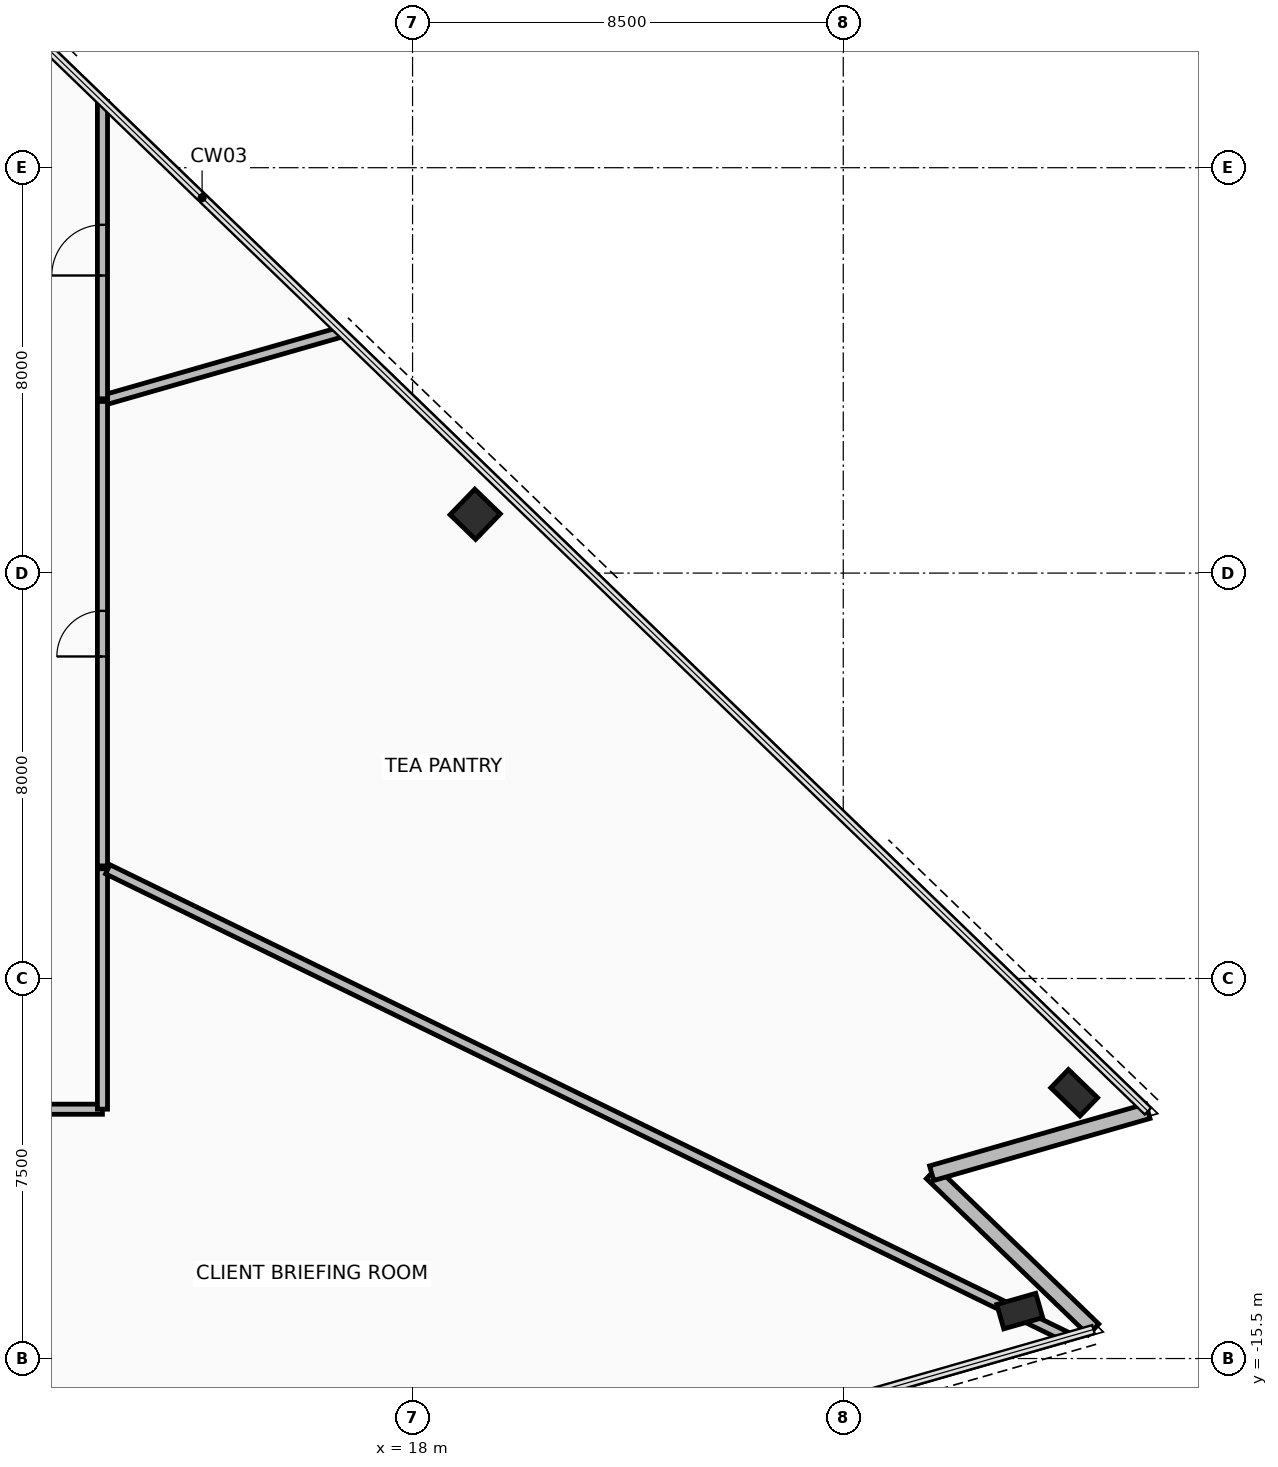
"""IFC4 building model, lengths in metres.
Left out: names, types, materials, properties, quantities, classifications, styles, units other than length and angle.
Written with IfcOpenShell. Run it as: python <this file> out.ifc"""

import sys

from ifc_helpers import new_model, si_unit, direction, frame, frame_2d, origin, origin_2d, place, context, subcontext, project, spatial, rectangle, hollow_rectangle, extrude, element, fill, save


model = new_model("IFC4")
c1 = context("Model", 3, precision=1e-05, world=origin(), true_north=direction((0.0, 1.0)))
c2 = subcontext(c1, "Body", "Model", "MODEL_VIEW")
j1 = project(units=[si_unit("LENGTHUNIT", "METRE"), si_unit("PLANEANGLEUNIT", "RADIAN")], contexts=[c1])
p1 = place(None, origin())
s1 = spatial("IfcSite", under=j1, at=p1, CompositionType="ELEMENT")
p2 = place(p1, origin())
s2 = spatial("IfcBuilding", under=s1, at=p2, CompositionType="ELEMENT")
p3 = place(p2, frame((0.0, 0.0, 93.3)))
s3 = spatial("IfcBuildingStorey", under=s2, at=p3, CompositionType="ELEMENT", Elevation=93.3)
for number, where, z_axis, x_axis in (
    (1, (29.983, -14.564, 0.0), (0.0, 0.0, 1.0), (0.961, 0.276, 0.0)),
    (2, (31.058, -10.256, 0.0), (0.0, 0.0, 1.0), (-0.719, 0.695, 0.0)),
):
    element("IfcColumn", number, at=place(p3, frame(where, z_axis=z_axis, x_axis=x_axis)), inside=s3, PredefinedType="COLUMN", context=c2, shape_type="SweptSolid", body=[
        extrude(hollow_rectangle(XDim=0.5, YDim=0.8, WallThickness=0.04, at=origin_2d()), origin(), (0.0, 0.0, 1.0), 3.6),
    ])
p4 = place(p3, frame((19.236, 1.16, 0.0), z_axis=(0.0, 0.0, 1.0), x_axis=(-0.719339800339, 0.694658370459, 0.0)))
e3 = element("IfcColumn", 3, at=p4, inside=s3, PredefinedType="COLUMN", context=c2, shape_type="SweptSolid", body=[
    extrude(hollow_rectangle(XDim=0.7, YDim=0.7, WallThickness=0.04, at=origin_2d()), origin(), (0.0, 0.0, 1.0), 3.6),
])
p5 = place(p3, frame((31.439, -14.927, 0.0), z_axis=(0.0, 0.0, 1.0), x_axis=(-0.719317126864, 0.694681848763, 0.0)))
e4 = element("IfcWall", 4, at=p5, inside=s3, PredefinedType="STANDARD", context=c2, shape_type="SweptSolid", body=[
    extrude(rectangle(XDim=4.44, YDim=0.3, at=frame_2d((2.22, 0.0))), origin(), (0.0, 0.0, 1.0), 2.605),
])
p6 = place(p3, frame((28.245, -11.842, 0.0), z_axis=(0.0, 0.0, 1.0), x_axis=(0.961255810825, 0.275657878821, 0.0)))
e5 = element("IfcWall", 5, at=p6, inside=s3, PredefinedType="STANDARD", context=c2, shape_type="SweptSolid", body=[
    extrude(rectangle(XDim=4.44, YDim=0.3, at=frame_2d((2.22, 0.0))), origin(), (0.0, 0.0, 1.0), 2.605),
])
p7 = place(p3, frame((16.591, 4.757, 0.0), z_axis=(0.0, 0.0, 1.0), x_axis=(-0.961268012523, -0.275615326314, 0.0)))
e6 = element("IfcWall", 6, at=p7, inside=s3, PredefinedType="PARTITIONING", context=c2, shape_type="SweptSolid", body=[
    extrude(rectangle(XDim=4.867, YDim=0.2, at=frame_2d((2.434, 0.0))), origin(), (0.0, 0.0, 1.0), 2.605),
])
p8 = place(p3, frame((11.88, 3.44, 0.0), z_axis=(0.0, 0.0, 1.0), x_axis=(0.0, 1.0, 0.0)))
e7 = element("IfcWall", 7, at=p8, inside=s3, PredefinedType="PARTITIONING", context=c2, shape_type="SweptSolid", body=[
    extrude(rectangle(XDim=5.867, YDim=0.2, at=frame_2d((2.934, 0.0))), origin(), (0.0, 0.0, 1.0), 2.605),
])
p9 = place(p8, frame((2.433, 0.0, 0.0)))
e8 = element("IfcOpeningElement", 8, at=p9, cuts=e7, PredefinedType="OPENING", context=c2, shape_type="SweptSolid", body=[
    extrude(rectangle(XDim=1.0, YDim=2.15, at=frame_2d((0.5, 1.075))), frame((0.0, 0.11, 0.0), z_axis=(0.0, -1.0, 0.0), x_axis=(1.0, 0.0, 0.0)), (0.0, 0.0, 1.0), 0.22),
])
p10 = place(p3, frame((4.174, -10.58, 0.0), z_axis=(0.0, 0.0, 1.0), x_axis=(1.0, 0.0, 0.0)))
e9 = element("IfcWall", 9, at=p10, inside=s3, PredefinedType="PARTITIONING", context=c2, shape_type="SweptSolid", body=[
    extrude(rectangle(XDim=7.706, YDim=0.2, at=frame_2d((3.853, 0.0))), origin(), (0.0, 0.0, 1.0), 2.805),
])
p11 = place(p10, frame((3.253, 0.0, 0.0)))
e10 = element("IfcOpeningElement", 10, at=p11, cuts=e9, PredefinedType="OPENING", context=c2, shape_type="SweptSolid", body=[
    extrude(rectangle(XDim=1.2, YDim=2.15, at=frame_2d((0.6, 1.075))), frame((0.0, 0.11, 0.0), z_axis=(0.0, -1.0, 0.0), x_axis=(1.0, 0.0, 0.0)), (0.0, 0.0, 1.0), 0.22),
])
p12 = place(p3, frame((11.88, -10.579, 0.0), z_axis=(0.0, 0.0, 1.0), x_axis=(0.0, 1.0, 0.0)))
e11 = element("IfcWall", 11, at=p12, inside=s3, PredefinedType="PARTITIONING", context=c2, shape_type="SweptSolid", body=[
    extrude(rectangle(XDim=4.745, YDim=0.2, at=frame_2d((2.373, 0.0))), origin(), (0.0, 0.0, 1.0), 2.805),
])
p13 = place(p3, frame((11.985, -5.845, 0.0), z_axis=(0.0, 0.0, 1.0), x_axis=(0.898791396377, -0.438376579894, 0.0)))
e12 = element("IfcWall", 12, at=p13, inside=s3, PredefinedType="PARTITIONING", context=c2, shape_type="SweptSolid", body=[
    extrude(rectangle(XDim=21.059, YDim=0.2, at=frame_2d((10.53, 0.0))), origin(), (0.0, 0.0, 1.0), 2.605),
])
p14 = place(p3, frame((11.88, -5.779, 0.0), z_axis=(0.0, 0.0, 1.0), x_axis=(0.0, 1.0, 0.0)))
e13 = element("IfcWall", 13, at=p14, inside=s3, PredefinedType="PARTITIONING", context=c2, shape_type="SweptSolid", body=[
    extrude(rectangle(XDim=9.166, YDim=0.2, at=frame_2d((4.583, 0.0))), origin(), (0.0, 0.0, 1.0), 3.41),
])
p15 = place(p14, frame((4.133, 0.0, 0.0)))
e14 = element("IfcOpeningElement", 14, at=p15, cuts=e13, PredefinedType="OPENING", context=c2, shape_type="SweptSolid", body=[
    extrude(rectangle(XDim=0.9, YDim=2.1, at=frame_2d((0.45, 1.05))), frame((0.0, 0.11, 0.0), z_axis=(0.0, -1.0, 0.0), x_axis=(1.0, 0.0, 0.0)), (0.0, 0.0, 1.0), 0.22),
])
p16 = place(p9, origin())
e15 = element("IfcDoor", 15, at=p16, inside=s3, OperationType="SINGLE_SWING_RIGHT", PredefinedType="DOOR", context=c2, shape_type="SweptSolid", body=[
    extrude(rectangle(XDim=1.0, YDim=2.15, at=frame_2d((0.5, 1.075))), frame((0.0, 0.025, 0.0), z_axis=(0.0, -1.0, 0.0), x_axis=(1.0, 0.0, 0.0)), (0.0, 0.0, 1.0), 0.05),
])
fill(e8, e15)
p17 = place(p15, origin())
e16 = element("IfcDoor", 16, at=p17, inside=s3, OperationType="SINGLE_SWING_LEFT", PredefinedType="DOOR", context=c2, shape_type="SweptSolid", body=[
    extrude(rectangle(XDim=0.9, YDim=2.1, at=frame_2d((0.45, 1.05))), frame((0.0, 0.025, 0.0), z_axis=(0.0, -1.0, 0.0), x_axis=(1.0, 0.0, 0.0)), (0.0, 0.0, 1.0), 0.05),
])
fill(e14, e16)
save(model, sys.argv[1])
